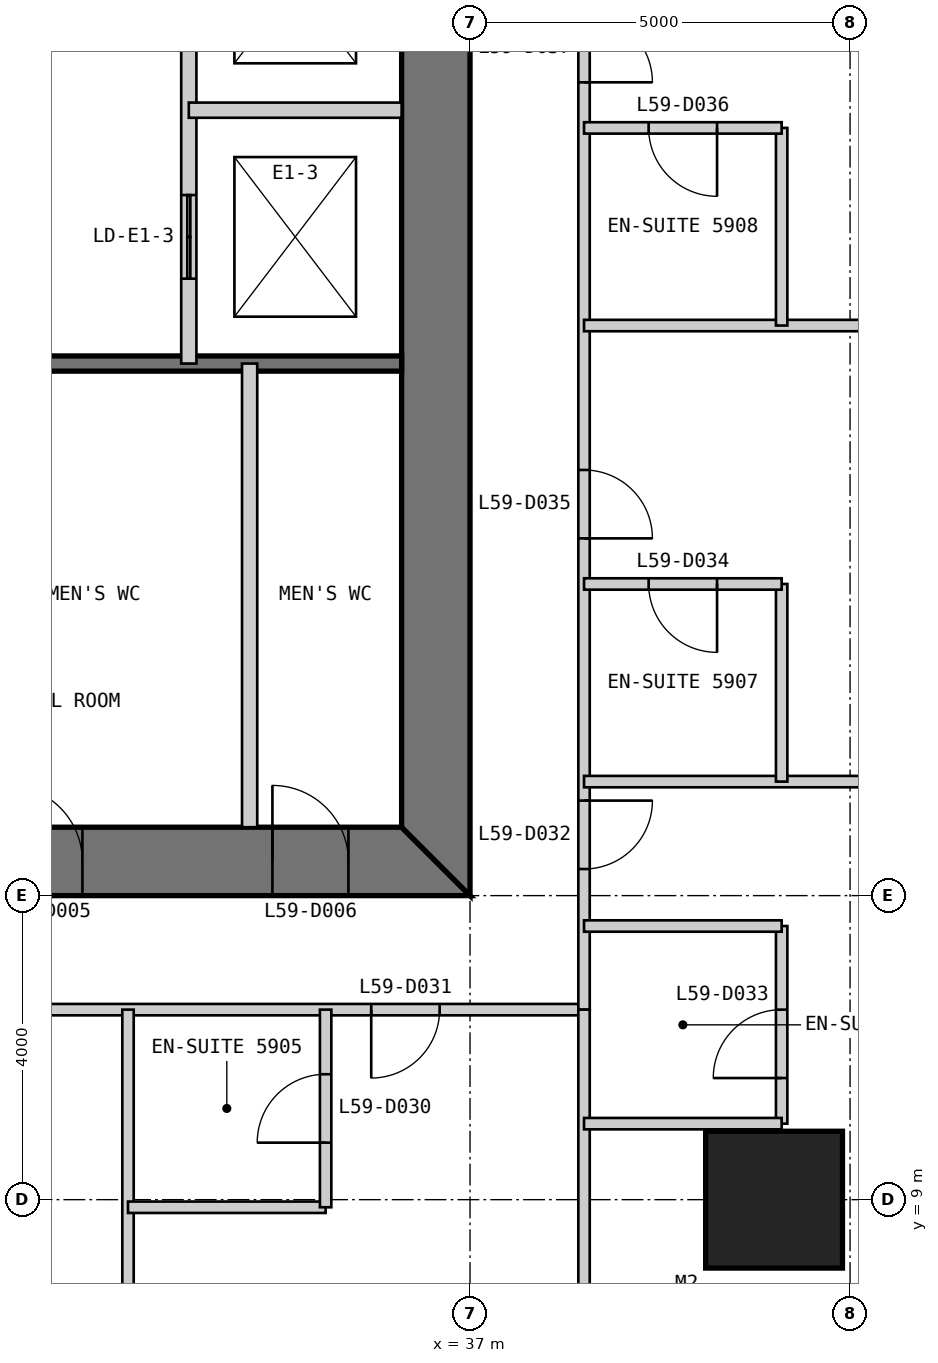
"""IFC4 building model, lengths in metres.
Left out: names, types, materials, properties, quantities, classifications, styles, units other than length and angle.
Written with IfcOpenShell. Run it as: python <this file> out.ifc"""

import sys

from ifc_helpers import new_model, si_unit, direction, frame, frame_2d, origin, origin_2d, place, context, subcontext, project, spatial, polyline, rectangle, outline, extrude, element, fill, save


model = new_model("IFC4")
c1 = context("Model", 3, precision=1e-05, world=origin(), true_north=direction((0.0, 1.0)))
c2 = subcontext(c1, "Body", "Model", "MODEL_VIEW")
j1 = project(units=[si_unit("LENGTHUNIT", "METRE"), si_unit("PLANEANGLEUNIT", "RADIAN")], contexts=[c1])
p1 = place(None, origin())
s1 = spatial("IfcSite", under=j1, at=p1, CompositionType="ELEMENT")
p2 = place(p1, origin())
s2 = spatial("IfcBuilding", under=s1, at=p2, CompositionType="ELEMENT")
p3 = place(p2, frame((0.0, 0.0, 252.6)))
s3 = spatial("IfcBuildingStorey", under=s2, at=p3, CompositionType="ELEMENT", Elevation=252.6)
p4 = place(p3, frame((41.0, 9.0, 0.0), z_axis=(0.0, 0.0, 1.0), x_axis=(1.0, 0.0, 0.0)))
e1 = element("IfcColumn", 1, at=p4, inside=s3, PredefinedType="COLUMN", context=c2, shape_type="SweptSolid", body=[
    extrude(rectangle(XDim=1.8, YDim=1.8, at=origin_2d()), origin(), (0.0, 0.0, 1.0), 3.4),
])
p5 = place(p3, frame((13.0, 13.45, 0.0), z_axis=(0.0, 0.0, 1.0), x_axis=(1.0, 0.0, 0.0)))
e2 = element("IfcWall", 2, at=p5, inside=s3, PredefinedType="SHEAR", context=c2, shape_type="SweptSolid", body=[
    extrude(outline(polyline([(0.0, -0.45), (24.0, -0.45), (23.1, 0.45), (0.9, 0.45), (0.0, -0.45)])), origin(), (0.0, 0.0, 1.0), 3.4),
])
p6 = place(p5, frame((4.9, 0.0, 0.0)))
e3 = element("IfcOpeningElement", 3, at=p6, cuts=e2, PredefinedType="OPENING", context=c2, shape_type="SweptSolid", body=[
    extrude(rectangle(XDim=1.0, YDim=2.2, at=frame_2d((0.5, 1.1))), frame((0.0, 0.46, 0.0), z_axis=(0.0, -1.0, 0.0), x_axis=(1.0, 0.0, 0.0)), (0.0, 0.0, 1.0), 0.92),
])
p7 = place(p5, frame((8.9, 0.0, 0.0)))
e4 = element("IfcOpeningElement", 4, at=p7, cuts=e2, PredefinedType="OPENING", context=c2, shape_type="SweptSolid", body=[
    extrude(rectangle(XDim=1.1, YDim=2.2, at=frame_2d((0.55, 1.1))), frame((0.0, 0.46, 0.0), z_axis=(0.0, -1.0, 0.0), x_axis=(1.0, 0.0, 0.0)), (0.0, 0.0, 1.0), 0.92),
])
p8 = place(p5, frame((15.05, 0.0, 0.0)))
e5 = element("IfcOpeningElement", 5, at=p8, cuts=e2, PredefinedType="OPENING", context=c2, shape_type="SweptSolid", body=[
    extrude(rectangle(XDim=0.9, YDim=2.2, at=frame_2d((0.45, 1.1))), frame((0.0, 0.46, 0.0), z_axis=(0.0, -1.0, 0.0), x_axis=(1.0, 0.0, 0.0)), (0.0, 0.0, 1.0), 0.92),
])
p9 = place(p5, frame((17.9, 0.0, 0.0)))
e6 = element("IfcOpeningElement", 6, at=p9, cuts=e2, PredefinedType="OPENING", context=c2, shape_type="SweptSolid", body=[
    extrude(rectangle(XDim=1.0, YDim=2.2, at=frame_2d((0.5, 1.1))), frame((0.0, 0.46, 0.0), z_axis=(0.0, -1.0, 0.0), x_axis=(1.0, 0.0, 0.0)), (0.0, 0.0, 1.0), 0.92),
])
p10 = place(p5, frame((21.4, 0.0, 0.0)))
e7 = element("IfcOpeningElement", 7, at=p10, cuts=e2, PredefinedType="OPENING", context=c2, shape_type="SweptSolid", body=[
    extrude(rectangle(XDim=1.0, YDim=2.2, at=frame_2d((0.5, 1.1))), frame((0.0, 0.46, 0.0), z_axis=(0.0, -1.0, 0.0), x_axis=(1.0, 0.0, 0.0)), (0.0, 0.0, 1.0), 0.92),
])
p11 = place(p3, frame((36.55, 13.9, 0.0), z_axis=(0.0, 0.0, 1.0), x_axis=(0.0, 1.0, 0.0)))
e8 = element("IfcWall", 8, at=p11, inside=s3, PredefinedType="SHEAR", context=c2, shape_type="SweptSolid", body=[
    extrude(outline(polyline([(-0.9, -0.45), (23.1, -0.45), (22.2, 0.45), (0.0, 0.45), (-0.9, -0.45)])), origin(), (0.0, 0.0, 1.0), 3.4),
])
p12 = place(p11, frame((20.2, 0.0, 0.0)))
e9 = element("IfcOpeningElement", 9, at=p12, cuts=e8, PredefinedType="OPENING", context=c2, shape_type="SweptSolid", body=[
    extrude(rectangle(XDim=1.0, YDim=2.2, at=frame_2d((0.5, 1.1))), frame((0.0, 0.46, 0.0), z_axis=(0.0, -1.0, 0.0), x_axis=(1.0, 0.0, 0.0)), (0.0, 0.0, 1.0), 0.92),
])
p13 = place(p11, frame((17.25, 0.0, 0.0)))
e10 = element("IfcOpeningElement", 10, at=p13, cuts=e8, PredefinedType="OPENING", context=c2, shape_type="SweptSolid", body=[
    extrude(rectangle(XDim=0.9, YDim=2.2, at=frame_2d((0.45, 1.1))), frame((0.0, 0.46, 0.0), z_axis=(0.0, -1.0, 0.0), x_axis=(1.0, 0.0, 0.0)), (0.0, 0.0, 1.0), 0.92),
])
p14 = place(p3, frame((20.3, 20.0, 0.0), z_axis=(0.0, 0.0, 1.0), x_axis=(1.0, 0.0, 0.0)))
e11 = element("IfcWall", 11, at=p14, inside=s3, PredefinedType="SOLIDWALL", context=c2, shape_type="SweptSolid", body=[
    extrude(rectangle(XDim=15.8, YDim=0.2, at=frame_2d((7.9, 0.0))), origin(), (0.0, 0.0, 1.0), 3.2),
])
p15 = place(p3, frame((34.1, 13.9, 0.0), z_axis=(0.0, 0.0, 1.0), x_axis=(0.0, 1.0, 0.0)))
e12 = element("IfcWall", 12, at=p15, inside=s3, PredefinedType="PARTITIONING", context=c2, shape_type="SweptSolid", body=[
    extrude(rectangle(XDim=6.1, YDim=0.2, at=frame_2d((3.05, 0.0))), origin(), (0.0, 0.0, 1.0), 3.2),
])
p16 = place(p3, frame((33.3, 36.1, 0.0), z_axis=(0.0, 0.0, 1.0), x_axis=(0.0, -1.0, 0.0)))
e13 = element("IfcWall", 13, at=p16, inside=s3, PredefinedType="PARTITIONING", context=c2, shape_type="SweptSolid", body=[
    extrude(rectangle(XDim=16.1, YDim=0.2, at=frame_2d((8.05, 0.0))), origin(), (0.0, 0.0, 1.0), 3.2),
])
p17 = place(p16, frame((7.217, 0.0, 0.0)))
e14 = element("IfcOpeningElement", 14, at=p17, cuts=e13, PredefinedType="OPENING", context=c2, shape_type="SweptSolid", body=[
    extrude(rectangle(XDim=1.1, YDim=2.2, at=frame_2d((0.55, 1.1))), frame((0.0, 0.11, 0.0), z_axis=(0.0, -1.0, 0.0), x_axis=(1.0, 0.0, 0.0)), (0.0, 0.0, 1.0), 0.22),
])
p18 = place(p16, frame((10.55, 0.0, 0.0)))
e15 = element("IfcOpeningElement", 15, at=p18, cuts=e13, PredefinedType="OPENING", context=c2, shape_type="SweptSolid", body=[
    extrude(rectangle(XDim=1.1, YDim=2.2, at=frame_2d((0.55, 1.1))), frame((0.0, 0.11, 0.0), z_axis=(0.0, -1.0, 0.0), x_axis=(1.0, 0.0, 0.0)), (0.0, 0.0, 1.0), 0.22),
])
p19 = place(p16, frame((13.883, 0.0, 0.0)))
e16 = element("IfcOpeningElement", 16, at=p19, cuts=e13, PredefinedType="OPENING", context=c2, shape_type="SweptSolid", body=[
    extrude(rectangle(XDim=1.1, YDim=2.2, at=frame_2d((0.55, 1.1))), frame((0.0, 0.11, 0.0), z_axis=(0.0, -1.0, 0.0), x_axis=(1.0, 0.0, 0.0)), (0.0, 0.0, 1.0), 0.22),
])
p20 = place(p3, frame((36.1, 23.333, 0.0), z_axis=(0.0, 0.0, 1.0), x_axis=(-1.0, 0.0, 0.0)))
e17 = element("IfcWall", 17, at=p20, inside=s3, PredefinedType="PARTITIONING", context=c2, shape_type="SweptSolid", body=[
    extrude(rectangle(XDim=2.8, YDim=0.2, at=frame_2d((1.4, 0.0))), origin(), (0.0, 0.0, 1.0), 3.2),
])
p21 = place(p3, frame((11.5, 11.5, 0.0), z_axis=(0.0, 0.0, 1.0), x_axis=(1.0, 0.0, 0.0)))
e18 = element("IfcWall", 18, at=p21, inside=s3, PredefinedType="PARTITIONING", context=c2, shape_type="SweptSolid", body=[
    extrude(rectangle(XDim=27.0, YDim=0.15, at=frame_2d((13.5, 0.0))), origin(), (0.0, 0.0, 1.0), 3.25),
])
p22 = place(p21, frame((1.85, 0.0, 0.0)))
e19 = element("IfcOpeningElement", 19, at=p22, cuts=e18, PredefinedType="OPENING", context=c2, shape_type="SweptSolid", body=[
    extrude(rectangle(XDim=0.9, YDim=2.1, at=frame_2d((0.45, 1.05))), frame((0.0, 0.085, 0.0), z_axis=(0.0, -1.0, 0.0), x_axis=(1.0, 0.0, 0.0)), (0.0, 0.0, 1.0), 0.17),
])
p23 = place(p21, frame((6.2, 0.0, 0.0)))
e20 = element("IfcOpeningElement", 20, at=p23, cuts=e18, PredefinedType="OPENING", context=c2, shape_type="SweptSolid", body=[
    extrude(rectangle(XDim=0.9, YDim=2.1, at=frame_2d((0.45, 1.05))), frame((0.0, 0.085, 0.0), z_axis=(0.0, -1.0, 0.0), x_axis=(1.0, 0.0, 0.0)), (0.0, 0.0, 1.0), 0.17),
])
p24 = place(p21, frame((12.2, 0.0, 0.0)))
e21 = element("IfcOpeningElement", 21, at=p24, cuts=e18, PredefinedType="OPENING", context=c2, shape_type="SweptSolid", body=[
    extrude(rectangle(XDim=0.9, YDim=2.1, at=frame_2d((0.45, 1.05))), frame((0.0, 0.085, 0.0), z_axis=(0.0, -1.0, 0.0), x_axis=(1.0, 0.0, 0.0)), (0.0, 0.0, 1.0), 0.17),
])
p25 = place(p21, frame((18.8, 0.0, 0.0)))
e22 = element("IfcOpeningElement", 22, at=p25, cuts=e18, PredefinedType="OPENING", context=c2, shape_type="SweptSolid", body=[
    extrude(rectangle(XDim=1.0, YDim=2.1, at=frame_2d((0.5, 1.05))), frame((0.0, 0.085, 0.0), z_axis=(0.0, -1.0, 0.0), x_axis=(1.0, 0.0, 0.0)), (0.0, 0.0, 1.0), 0.17),
])
p26 = place(p21, frame((24.2, 0.0, 0.0)))
e23 = element("IfcOpeningElement", 23, at=p26, cuts=e18, PredefinedType="OPENING", context=c2, shape_type="SweptSolid", body=[
    extrude(rectangle(XDim=0.9, YDim=2.1, at=frame_2d((0.45, 1.05))), frame((0.0, 0.085, 0.0), z_axis=(0.0, -1.0, 0.0), x_axis=(1.0, 0.0, 0.0)), (0.0, 0.0, 1.0), 0.17),
])
p27 = place(p3, frame((32.5, 0.15, 0.0), z_axis=(0.0, 0.0, 1.0), x_axis=(0.0, 1.0, 0.0)))
e24 = element("IfcWall", 24, at=p27, inside=s3, PredefinedType="PARTITIONING", context=c2, shape_type="SweptSolid", body=[
    extrude(rectangle(XDim=11.35, YDim=0.15, at=frame_2d((5.675, 0.0))), origin(), (0.0, 0.0, 1.0), 3.25),
])
p28 = place(p3, frame((32.5, 8.9, 0.0), z_axis=(0.0, 0.0, 1.0), x_axis=(1.0, 0.0, 0.0)))
e25 = element("IfcWall", 25, at=p28, inside=s3, PredefinedType="PARTITIONING", context=c2, shape_type="SweptSolid", body=[
    extrude(rectangle(XDim=2.6, YDim=0.15, at=frame_2d((1.3, 0.0))), origin(), (0.0, 0.0, 1.0), 3.25),
])
p29 = place(p3, frame((35.1, 8.9, 0.0), z_axis=(0.0, 0.0, 1.0), x_axis=(0.0, 1.0, 0.0)))
e26 = element("IfcWall", 26, at=p29, inside=s3, PredefinedType="PARTITIONING", context=c2, shape_type="SweptSolid", body=[
    extrude(rectangle(XDim=2.6, YDim=0.15, at=frame_2d((1.3, 0.0))), origin(), (0.0, 0.0, 1.0), 3.25),
])
p30 = place(p29, frame((0.85, 0.0, 0.0)))
e27 = element("IfcOpeningElement", 27, at=p30, cuts=e26, PredefinedType="OPENING", context=c2, shape_type="SweptSolid", body=[
    extrude(rectangle(XDim=0.9, YDim=2.1, at=frame_2d((0.45, 1.05))), frame((0.0, 0.085, 0.0), z_axis=(0.0, -1.0, 0.0), x_axis=(1.0, 0.0, 0.0)), (0.0, 0.0, 1.0), 0.17),
])
p31 = place(p3, frame((38.5, 11.5, 0.0), z_axis=(0.0, 0.0, 1.0), x_axis=(0.0, 1.0, 0.0)))
e28 = element("IfcWall", 28, at=p31, inside=s3, PredefinedType="PARTITIONING", context=c2, shape_type="SweptSolid", body=[
    extrude(rectangle(XDim=27.0, YDim=0.15, at=frame_2d((13.5, 0.0))), origin(), (0.0, 0.0, 1.0), 3.25),
])
p32 = place(p31, frame((1.85, 0.0, 0.0)))
e29 = element("IfcOpeningElement", 29, at=p32, cuts=e28, PredefinedType="OPENING", context=c2, shape_type="SweptSolid", body=[
    extrude(rectangle(XDim=0.9, YDim=2.1, at=frame_2d((0.45, 1.05))), frame((0.0, 0.085, 0.0), z_axis=(0.0, -1.0, 0.0), x_axis=(1.0, 0.0, 0.0)), (0.0, 0.0, 1.0), 0.17),
])
p33 = place(p31, frame((6.2, 0.0, 0.0)))
e30 = element("IfcOpeningElement", 30, at=p33, cuts=e28, PredefinedType="OPENING", context=c2, shape_type="SweptSolid", body=[
    extrude(rectangle(XDim=0.9, YDim=2.1, at=frame_2d((0.45, 1.05))), frame((0.0, 0.085, 0.0), z_axis=(0.0, -1.0, 0.0), x_axis=(1.0, 0.0, 0.0)), (0.0, 0.0, 1.0), 0.17),
])
p34 = place(p31, frame((12.2, 0.0, 0.0)))
e31 = element("IfcOpeningElement", 31, at=p34, cuts=e28, PredefinedType="OPENING", context=c2, shape_type="SweptSolid", body=[
    extrude(rectangle(XDim=0.9, YDim=2.1, at=frame_2d((0.45, 1.05))), frame((0.0, 0.085, 0.0), z_axis=(0.0, -1.0, 0.0), x_axis=(1.0, 0.0, 0.0)), (0.0, 0.0, 1.0), 0.17),
])
p35 = place(p31, frame((18.2, 0.0, 0.0)))
e32 = element("IfcOpeningElement", 32, at=p35, cuts=e28, PredefinedType="OPENING", context=c2, shape_type="SweptSolid", body=[
    extrude(rectangle(XDim=0.9, YDim=2.1, at=frame_2d((0.45, 1.05))), frame((0.0, 0.085, 0.0), z_axis=(0.0, -1.0, 0.0), x_axis=(1.0, 0.0, 0.0)), (0.0, 0.0, 1.0), 0.17),
])
p36 = place(p31, frame((24.2, 0.0, 0.0)))
e33 = element("IfcOpeningElement", 33, at=p36, cuts=e28, PredefinedType="OPENING", context=c2, shape_type="SweptSolid", body=[
    extrude(rectangle(XDim=0.9, YDim=2.1, at=frame_2d((0.45, 1.05))), frame((0.0, 0.085, 0.0), z_axis=(0.0, -1.0, 0.0), x_axis=(1.0, 0.0, 0.0)), (0.0, 0.0, 1.0), 0.17),
])
p37 = place(p3, frame((38.5, 0.15, 0.0), z_axis=(0.0, 0.0, 1.0), x_axis=(0.0, 1.0, 0.0)))
e34 = element("IfcWall", 34, at=p37, inside=s3, PredefinedType="PARTITIONING", context=c2, shape_type="SweptSolid", body=[
    extrude(rectangle(XDim=11.35, YDim=0.15, at=frame_2d((5.675, 0.0))), origin(), (0.0, 0.0, 1.0), 3.25),
])
p38 = place(p3, frame((41.1, 10.0, 0.0), z_axis=(0.0, 0.0, 1.0), x_axis=(0.0, 1.0, 0.0)))
e35 = element("IfcWall", 35, at=p38, inside=s3, PredefinedType="PARTITIONING", context=c2, shape_type="SweptSolid", body=[
    extrude(rectangle(XDim=2.6, YDim=0.15, at=frame_2d((1.3, 0.0))), origin(), (0.0, 0.0, 1.0), 2.638),
])
p39 = place(p38, frame((0.6, 0.0, 0.0)))
e36 = element("IfcOpeningElement", 36, at=p39, cuts=e35, PredefinedType="OPENING", context=c2, shape_type="SweptSolid", body=[
    extrude(rectangle(XDim=0.9, YDim=2.1, at=frame_2d((0.45, 1.05))), frame((0.0, 0.085, 0.0), z_axis=(0.0, -1.0, 0.0), x_axis=(1.0, 0.0, 0.0)), (0.0, 0.0, 1.0), 0.17),
])
for number, where, z_axis, x_axis in (
    (37, (41.1, 10.0, 0.0), (0.0, 0.0, 1.0), (-1.0, 0.0, 0.0)),
    (38, (41.1, 12.6, 0.0), (0.0, 0.0, 1.0), (-1.0, 0.0, 0.0)),
):
    element("IfcWall", number, at=place(p3, frame(where, z_axis=z_axis, x_axis=x_axis)), inside=s3, PredefinedType="PARTITIONING", context=c2, shape_type="SweptSolid", body=[
        extrude(rectangle(XDim=2.6, YDim=0.15, at=frame_2d((1.3, 0.0))), origin(), (0.0, 0.0, 1.0), 3.25),
    ])
p40 = place(p3, frame((49.85, 14.5, 0.0), z_axis=(0.0, 0.0, 1.0), x_axis=(-1.0, 0.0, 0.0)))
e39 = element("IfcWall", 39, at=p40, inside=s3, PredefinedType="PARTITIONING", context=c2, shape_type="SweptSolid", body=[
    extrude(rectangle(XDim=11.35, YDim=0.15, at=frame_2d((5.675, 0.0))), origin(), (0.0, 0.0, 1.0), 3.25),
])
p41 = place(p3, frame((41.1, 14.5, 0.0), z_axis=(0.0, 0.0, 1.0), x_axis=(0.0, 1.0, 0.0)))
e40 = element("IfcWall", 40, at=p41, inside=s3, PredefinedType="PARTITIONING", context=c2, shape_type="SweptSolid", body=[
    extrude(rectangle(XDim=2.6, YDim=0.15, at=frame_2d((1.3, 0.0))), origin(), (0.0, 0.0, 1.0), 3.25),
])
p42 = place(p3, frame((41.1, 17.1, 0.0), z_axis=(0.0, 0.0, 1.0), x_axis=(-1.0, 0.0, 0.0)))
e41 = element("IfcWall", 41, at=p42, inside=s3, PredefinedType="PARTITIONING", context=c2, shape_type="SweptSolid", body=[
    extrude(rectangle(XDim=2.6, YDim=0.15, at=frame_2d((1.3, 0.0))), origin(), (0.0, 0.0, 1.0), 3.25),
])
p43 = place(p42, frame((0.85, 0.0, 0.0)))
e42 = element("IfcOpeningElement", 42, at=p43, cuts=e41, PredefinedType="OPENING", context=c2, shape_type="SweptSolid", body=[
    extrude(rectangle(XDim=0.9, YDim=2.1, at=frame_2d((0.45, 1.05))), frame((0.0, 0.085, 0.0), z_axis=(0.0, -1.0, 0.0), x_axis=(1.0, 0.0, 0.0)), (0.0, 0.0, 1.0), 0.17),
])
p44 = place(p3, frame((49.85, 20.5, 0.0), z_axis=(0.0, 0.0, 1.0), x_axis=(-1.0, 0.0, 0.0)))
e43 = element("IfcWall", 43, at=p44, inside=s3, PredefinedType="PARTITIONING", context=c2, shape_type="SweptSolid", body=[
    extrude(rectangle(XDim=11.35, YDim=0.15, at=frame_2d((5.675, 0.0))), origin(), (0.0, 0.0, 1.0), 3.25),
])
p45 = place(p3, frame((41.1, 20.5, 0.0), z_axis=(0.0, 0.0, 1.0), x_axis=(0.0, 1.0, 0.0)))
e44 = element("IfcWall", 44, at=p45, inside=s3, PredefinedType="PARTITIONING", context=c2, shape_type="SweptSolid", body=[
    extrude(rectangle(XDim=2.6, YDim=0.15, at=frame_2d((1.3, 0.0))), origin(), (0.0, 0.0, 1.0), 3.25),
])
p46 = place(p3, frame((41.1, 23.1, 0.0), z_axis=(0.0, 0.0, 1.0), x_axis=(-1.0, 0.0, 0.0)))
e45 = element("IfcWall", 45, at=p46, inside=s3, PredefinedType="PARTITIONING", context=c2, shape_type="SweptSolid", body=[
    extrude(rectangle(XDim=2.6, YDim=0.15, at=frame_2d((1.3, 0.0))), origin(), (0.0, 0.0, 1.0), 3.25),
])
p47 = place(p46, frame((0.85, 0.0, 0.0)))
e46 = element("IfcOpeningElement", 46, at=p47, cuts=e45, PredefinedType="OPENING", context=c2, shape_type="SweptSolid", body=[
    extrude(rectangle(XDim=0.9, YDim=2.1, at=frame_2d((0.45, 1.05))), frame((0.0, 0.085, 0.0), z_axis=(0.0, -1.0, 0.0), x_axis=(1.0, 0.0, 0.0)), (0.0, 0.0, 1.0), 0.17),
])
p48 = place(p9, origin())
e47 = element("IfcDoor", 47, at=p48, inside=s3, OperationType="SINGLE_SWING_LEFT", PredefinedType="DOOR", context=c2, shape_type="SweptSolid", body=[
    extrude(rectangle(XDim=1.0, YDim=2.2, at=frame_2d((0.5, 1.1))), frame((0.0, 0.025, 0.0), z_axis=(0.0, -1.0, 0.0), x_axis=(1.0, 0.0, 0.0)), (0.0, 0.0, 1.0), 0.05),
    extrude(outline(polyline([(0.0, 0.0), (0.04, 0.0), (0.04, 2.16), (0.96, 2.16), (0.96, 0.0), (1.0, 0.0), (1.0, 2.2), (0.0, 2.2), (0.0, 0.0)])), frame((0.0, 0.3, 0.0), z_axis=(0.0, -1.0, 0.0), x_axis=(1.0, 0.0, 0.0)), (0.0, 0.0, 1.0), 0.6),
])
fill(e6, e47)
p49 = place(p10, origin())
e48 = element("IfcDoor", 48, at=p49, inside=s3, OperationType="SINGLE_SWING_LEFT", PredefinedType="DOOR", context=c2, shape_type="SweptSolid", body=[
    extrude(rectangle(XDim=1.0, YDim=2.2, at=frame_2d((0.5, 1.1))), frame((0.0, 0.025, 0.0), z_axis=(0.0, -1.0, 0.0), x_axis=(1.0, 0.0, 0.0)), (0.0, 0.0, 1.0), 0.05),
    extrude(outline(polyline([(0.0, 0.0), (0.04, 0.0), (0.04, 2.16), (0.96, 2.16), (0.96, 0.0), (1.0, 0.0), (1.0, 2.2), (0.0, 2.2), (0.0, 0.0)])), frame((0.0, 0.3, 0.0), z_axis=(0.0, -1.0, 0.0), x_axis=(1.0, 0.0, 0.0)), (0.0, 0.0, 1.0), 0.6),
])
fill(e7, e48)
p50 = place(p30, origin())
e49 = element("IfcDoor", 49, at=p50, inside=s3, OperationType="SINGLE_SWING_LEFT", PredefinedType="DOOR", context=c2, shape_type="SweptSolid", body=[
    extrude(rectangle(XDim=0.9, YDim=2.1, at=frame_2d((0.45, 1.05))), frame((0.0, 0.025, 0.0), z_axis=(0.0, -1.0, 0.0), x_axis=(1.0, 0.0, 0.0)), (0.0, 0.0, 1.0), 0.05),
])
fill(e27, e49)
p51 = place(p26, frame((0.9, 0.0, 0.0), z_axis=(0.0, 0.0, 1.0), x_axis=(-1.0, 0.0, 0.0)))
e50 = element("IfcDoor", 50, at=p51, inside=s3, OperationType="SINGLE_SWING_RIGHT", PredefinedType="DOOR", context=c2, shape_type="SweptSolid", body=[
    extrude(rectangle(XDim=0.9, YDim=2.1, at=frame_2d((0.45, 1.05))), frame((0.0, 0.025, 0.0), z_axis=(0.0, -1.0, 0.0), x_axis=(1.0, 0.0, 0.0)), (0.0, 0.0, 1.0), 0.05),
])
fill(e23, e50)
p52 = place(p32, frame((0.9, 0.0, 0.0), z_axis=(0.0, 0.0, 1.0), x_axis=(-1.0, 0.0, 0.0)))
e51 = element("IfcDoor", 51, at=p52, inside=s3, OperationType="SINGLE_SWING_LEFT", PredefinedType="DOOR", context=c2, shape_type="SweptSolid", body=[
    extrude(rectangle(XDim=0.9, YDim=2.1, at=frame_2d((0.45, 1.05))), frame((0.0, 0.025, 0.0), z_axis=(0.0, -1.0, 0.0), x_axis=(1.0, 0.0, 0.0)), (0.0, 0.0, 1.0), 0.05),
])
fill(e29, e51)
p53 = place(p39, origin())
e52 = element("IfcDoor", 52, at=p53, inside=s3, OperationType="SINGLE_SWING_LEFT", PredefinedType="DOOR", context=c2, shape_type="SweptSolid", body=[
    extrude(rectangle(XDim=0.9, YDim=2.1, at=frame_2d((0.45, 1.05))), frame((0.0, 0.025, 0.0), z_axis=(0.0, -1.0, 0.0), x_axis=(1.0, 0.0, 0.0)), (0.0, 0.0, 1.0), 0.05),
])
fill(e36, e52)
p54 = place(p43, origin())
e53 = element("IfcDoor", 53, at=p54, inside=s3, OperationType="SINGLE_SWING_LEFT", PredefinedType="DOOR", context=c2, shape_type="SweptSolid", body=[
    extrude(rectangle(XDim=0.9, YDim=2.1, at=frame_2d((0.45, 1.05))), frame((0.0, 0.025, 0.0), z_axis=(0.0, -1.0, 0.0), x_axis=(1.0, 0.0, 0.0)), (0.0, 0.0, 1.0), 0.05),
])
fill(e42, e53)
p55 = place(p33, frame((0.9, 0.0, 0.0), z_axis=(0.0, 0.0, 1.0), x_axis=(-1.0, 0.0, 0.0)))
e54 = element("IfcDoor", 54, at=p55, inside=s3, OperationType="SINGLE_SWING_RIGHT", PredefinedType="DOOR", context=c2, shape_type="SweptSolid", body=[
    extrude(rectangle(XDim=0.9, YDim=2.1, at=frame_2d((0.45, 1.05))), frame((0.0, 0.025, 0.0), z_axis=(0.0, -1.0, 0.0), x_axis=(1.0, 0.0, 0.0)), (0.0, 0.0, 1.0), 0.05),
])
fill(e30, e54)
p56 = place(p47, origin())
e55 = element("IfcDoor", 55, at=p56, inside=s3, OperationType="SINGLE_SWING_LEFT", PredefinedType="DOOR", context=c2, shape_type="SweptSolid", body=[
    extrude(rectangle(XDim=0.9, YDim=2.1, at=frame_2d((0.45, 1.05))), frame((0.0, 0.025, 0.0), z_axis=(0.0, -1.0, 0.0), x_axis=(1.0, 0.0, 0.0)), (0.0, 0.0, 1.0), 0.05),
])
fill(e46, e55)
p57 = place(p34, frame((0.9, 0.0, 0.0), z_axis=(0.0, 0.0, 1.0), x_axis=(-1.0, 0.0, 0.0)))
e56 = element("IfcDoor", 56, at=p57, inside=s3, OperationType="SINGLE_SWING_RIGHT", PredefinedType="DOOR", context=c2, shape_type="SweptSolid", body=[
    extrude(rectangle(XDim=0.9, YDim=2.1, at=frame_2d((0.45, 1.05))), frame((0.0, 0.025, 0.0), z_axis=(0.0, -1.0, 0.0), x_axis=(1.0, 0.0, 0.0)), (0.0, 0.0, 1.0), 0.05),
])
fill(e31, e56)
p58 = place(p19, origin())
e57 = element("IfcDoor", 57, at=p58, inside=s3, OperationType="DOUBLE_DOOR_SLIDING", PredefinedType="DOOR", context=c2, shape_type="SweptSolid", body=[
    extrude(rectangle(XDim=1.1, YDim=2.2, at=frame_2d((0.55, 1.1))), frame((0.0, 0.025, 0.0), z_axis=(0.0, -1.0, 0.0), x_axis=(1.0, 0.0, 0.0)), (0.0, 0.0, 1.0), 0.05),
])
fill(e16, e57)
save(model, sys.argv[1])
